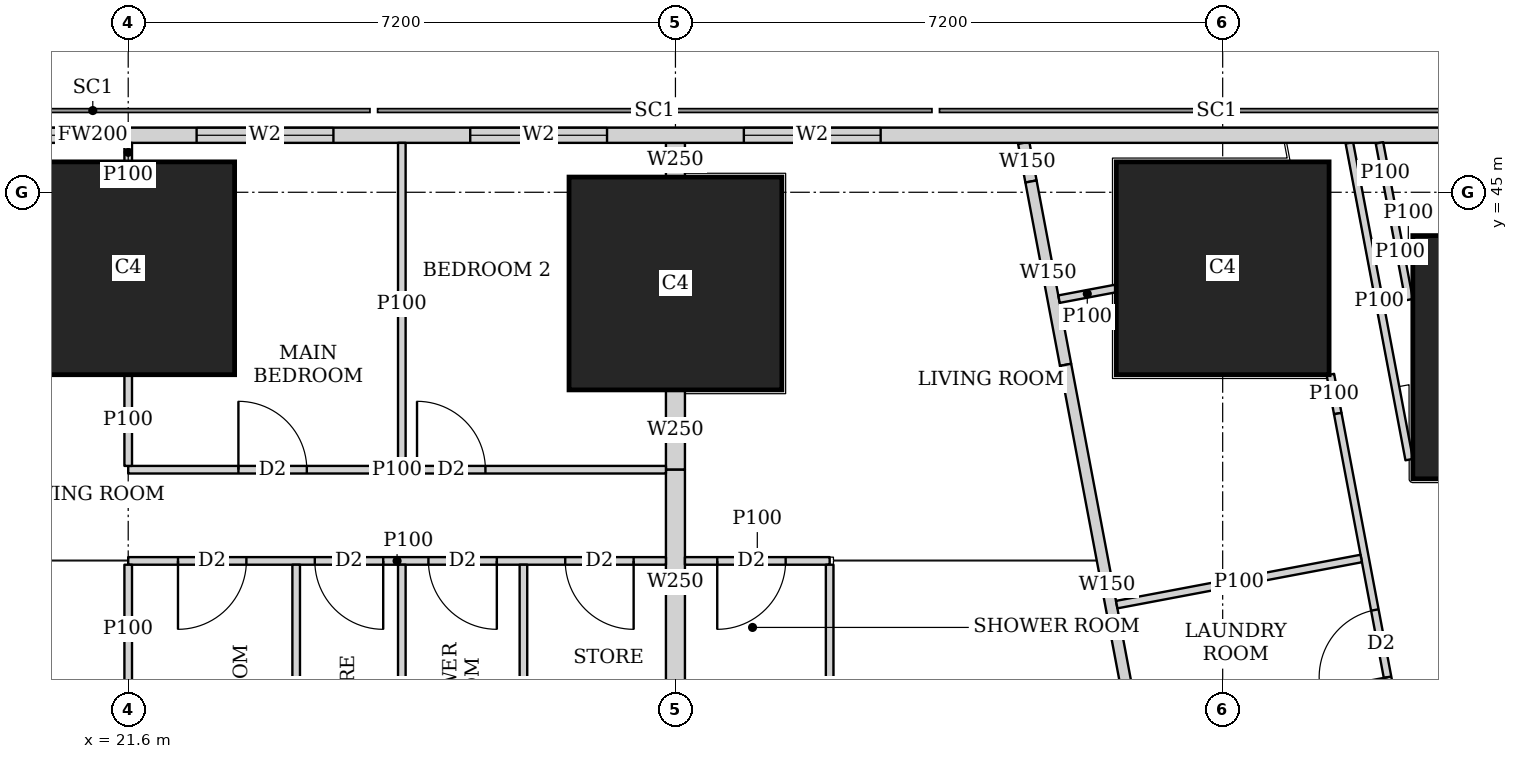
"""IFC4 building model, lengths in metres.
Left out: names, types, materials, properties, quantities, classifications, styles, units other than length and angle.
Written with IfcOpenShell. Run it as: python <this file> out.ifc"""

import sys

from ifc_helpers import new_model, si_unit, direction, frame, frame_2d, origin, origin_2d, place, context, subcontext, project, spatial, rectangle, extrude, element, fill, save


model = new_model("IFC4")
c1 = context("Model", 3, precision=1e-05, world=origin(), true_north=direction((0.0, 1.0)))
c2 = subcontext(c1, "Body", "Model", "MODEL_VIEW")
j1 = project(units=[si_unit("LENGTHUNIT", "METRE"), si_unit("PLANEANGLEUNIT", "RADIAN")], contexts=[c1])
p1 = place(None, origin())
s1 = spatial("IfcSite", under=j1, at=p1, CompositionType="ELEMENT")
p2 = place(p1, origin())
s2 = spatial("IfcBuilding", under=s1, at=p2, CompositionType="ELEMENT")
p3 = place(p2, frame((0.0, 0.0, 53.75)))
s3 = spatial("IfcBuildingStorey", under=s2, at=p3, CompositionType="ELEMENT", Elevation=53.75)
p4 = place(p3, frame((40.102, 42.83, 0.0), z_axis=(0.0, 0.0, 1.0), x_axis=(1.0, 0.0, 0.0)))
e1 = element("IfcColumn", 1, at=p4, inside=s3, PredefinedType="COLUMN", context=c2, shape_type="SweptSolid", body=[
    extrude(rectangle(XDim=3.2, YDim=3.2, at=origin_2d()), origin(), (0.0, 0.0, 1.0), 3.75),
])
for number, where, z_axis, x_axis in (
    (2, (21.6, 44.0, 0.0), (0.0, 0.0, 1.0), (1.0, 0.0, 0.0)),
    (3, (28.8, 43.8, 0.0), (0.0, 0.0, 1.0), (1.0, 0.0, 0.0)),
    (4, (36.0, 44.0, 0.0), (0.0, 0.0, 1.0), (1.0, 0.0, 0.0)),
):
    element("IfcColumn", number, at=place(p3, frame(where, z_axis=z_axis, x_axis=x_axis)), inside=s3, PredefinedType="COLUMN", context=c2, shape_type="SweptSolid", body=[
        extrude(rectangle(XDim=2.8, YDim=2.8, at=origin_2d()), origin(), (0.0, 0.0, 1.0), 3.75),
    ])
p5 = place(p3, frame((40.106, 45.75, 0.0), z_axis=(0.0, 0.0, 1.0), x_axis=(-1.0, 0.0, 0.0)))
e5 = element("IfcWall", 5, at=p5, inside=s3, PredefinedType="SOLIDWALL", context=c2, shape_type="SweptSolid", body=[
    extrude(rectangle(XDim=37.943, YDim=0.2, at=frame_2d((18.971, 0.0))), origin(), (0.0, 0.0, 1.0), 3.5),
])
p6 = place(p5, frame((8.606, 0.0, 0.9)))
e6 = element("IfcOpeningElement", 6, at=p6, cuts=e5, PredefinedType="OPENING", context=c2, shape_type="SweptSolid", body=[
    extrude(rectangle(XDim=1.8, YDim=1.5, at=frame_2d((0.9, 0.75))), frame((0.0, 0.11, 0.0), z_axis=(0.0, -1.0, 0.0), x_axis=(1.0, 0.0, 0.0)), (0.0, 0.0, 1.0), 0.22),
])
p7 = place(p5, frame((12.206, 0.0, 0.9)))
e7 = element("IfcOpeningElement", 7, at=p7, cuts=e5, PredefinedType="OPENING", context=c2, shape_type="SweptSolid", body=[
    extrude(rectangle(XDim=1.8, YDim=1.5, at=frame_2d((0.9, 0.75))), frame((0.0, 0.11, 0.0), z_axis=(0.0, -1.0, 0.0), x_axis=(1.0, 0.0, 0.0)), (0.0, 0.0, 1.0), 0.22),
])
p8 = place(p5, frame((15.806, 0.0, 0.9)))
e8 = element("IfcOpeningElement", 8, at=p8, cuts=e5, PredefinedType="OPENING", context=c2, shape_type="SweptSolid", body=[
    extrude(rectangle(XDim=1.8, YDim=1.5, at=frame_2d((0.9, 0.75))), frame((0.0, 0.11, 0.0), z_axis=(0.0, -1.0, 0.0), x_axis=(1.0, 0.0, 0.0)), (0.0, 0.0, 1.0), 0.22),
])
p9 = place(p5, frame((19.406, 0.0, 0.9)))
e9 = element("IfcOpeningElement", 9, at=p9, cuts=e5, PredefinedType="OPENING", context=c2, shape_type="SweptSolid", body=[
    extrude(rectangle(XDim=1.8, YDim=1.5, at=frame_2d((0.9, 0.75))), frame((0.0, 0.11, 0.0), z_axis=(0.0, -1.0, 0.0), x_axis=(1.0, 0.0, 0.0)), (0.0, 0.0, 1.0), 0.22),
])
p10 = place(p5, frame((23.006, 0.0, 0.9)))
e10 = element("IfcOpeningElement", 10, at=p10, cuts=e5, PredefinedType="OPENING", context=c2, shape_type="SweptSolid", body=[
    extrude(rectangle(XDim=1.8, YDim=1.5, at=frame_2d((0.9, 0.75))), frame((0.0, 0.11, 0.0), z_axis=(0.0, -1.0, 0.0), x_axis=(1.0, 0.0, 0.0)), (0.0, 0.0, 1.0), 0.22),
])
p11 = place(p5, frame((26.606, 0.0, 0.9)))
e11 = element("IfcOpeningElement", 11, at=p11, cuts=e5, PredefinedType="OPENING", context=c2, shape_type="SweptSolid", body=[
    extrude(rectangle(XDim=1.8, YDim=1.5, at=frame_2d((0.9, 0.75))), frame((0.0, 0.11, 0.0), z_axis=(0.0, -1.0, 0.0), x_axis=(1.0, 0.0, 0.0)), (0.0, 0.0, 1.0), 0.22),
])
p12 = place(p3, frame((33.382, 45.65, 0.0), z_axis=(0.0, 0.0, 1.0), x_axis=(0.185657456326, -0.982614527122, 0.0)))
e12 = element("IfcWall", 12, at=p12, inside=s3, PredefinedType="SOLIDWALL", context=c2, shape_type="SweptSolid", body=[
    extrude(rectangle(XDim=0.517, YDim=0.15, at=frame_2d((0.258, 0.0))), origin(), (0.0, 0.0, 1.0), 3.5),
])
p13 = place(p3, frame((33.478, 45.142, 0.0), z_axis=(0.0, 0.0, 1.0), x_axis=(0.185393362436, -0.982664388876, 0.0)))
e13 = element("IfcWall", 13, at=p13, inside=s3, PredefinedType="SOLIDWALL", context=c2, shape_type="SweptSolid", body=[
    extrude(rectangle(XDim=2.455, YDim=0.15, at=frame_2d((1.227, 0.0))), origin(), (0.0, 0.0, 1.0), 2.05),
])
p14 = place(p3, frame((33.933, 42.73, 0.0), z_axis=(0.0, 0.0, 1.0), x_axis=(0.185617897238, -0.982622000682, 0.0)))
e14 = element("IfcWall", 14, at=p14, inside=s3, PredefinedType="SOLIDWALL", context=c2, shape_type="SweptSolid", body=[
    extrude(rectangle(XDim=5.887, YDim=0.15, at=frame_2d((2.944, 0.0))), origin(), (0.0, 0.0, 1.0), 3.5),
])
p15 = place(p3, frame((38.454, 41.483, 0.0), z_axis=(0.0, 0.0, 1.0), x_axis=(-0.185609245326, 0.982623634994, 0.0)))
e15 = element("IfcWall", 15, at=p15, inside=s3, PredefinedType="PARTITIONING", context=c2, shape_type="SweptSolid", body=[
    extrude(rectangle(XDim=4.241, YDim=0.1, at=frame_2d((2.12, 0.0))), origin(), (0.0, 0.0, 1.0), 2.05),
])
p16 = place(p3, frame((38.063, 45.65, 0.0), z_axis=(0.0, 0.0, 1.0), x_axis=(0.186109918919, -0.982528929895, 0.0)))
e16 = element("IfcWall", 16, at=p16, inside=s3, PredefinedType="PARTITIONING", context=c2, shape_type="SweptSolid", body=[
    extrude(rectangle(XDim=0.817, YDim=0.1, at=frame_2d((0.409, 0.0))), origin(), (0.0, 0.0, 1.0), 3.5),
])
p17 = place(p3, frame((38.215, 44.847, 0.0), z_axis=(0.0, 0.0, 1.0), x_axis=(0.185449486507, -0.982653798626, 0.0)))
e17 = element("IfcWall", 17, at=p17, inside=s3, PredefinedType="PARTITIONING", context=c2, shape_type="SweptSolid", body=[
    extrude(rectangle(XDim=1.282, YDim=0.1, at=frame_2d((0.641, 0.0))), origin(), (0.0, 0.0, 1.0), 2.05),
])
p18 = place(p3, frame((37.417, 42.602, 0.0), z_axis=(0.0, 0.0, 1.0), x_axis=(0.185672001976, -0.982611778721, 0.0)))
e18 = element("IfcWall", 18, at=p18, inside=s3, PredefinedType="PARTITIONING", context=c2, shape_type="SweptSolid", body=[
    extrude(rectangle(XDim=0.522, YDim=0.1, at=frame_2d((0.261, 0.0))), origin(), (0.0, 0.0, 1.0), 2.05),
])
p19 = place(p3, frame((37.514, 42.089, 0.0), z_axis=(0.0, 0.0, 1.0), x_axis=(0.1856087397, -0.982623730503, 0.0)))
e19 = element("IfcWall", 19, at=p19, inside=s3, PredefinedType="PARTITIONING", context=c2, shape_type="SweptSolid", body=[
    extrude(rectangle(XDim=13.33, YDim=0.1, at=frame_2d((6.665, 0.0))), origin(), (0.0, 0.0, 1.0), 2.5),
])
p20 = place(p19, frame((11.825, 0.0, 0.0)))
e20 = element("IfcOpeningElement", 20, at=p20, cuts=e19, PredefinedType="OPENING", context=c2, shape_type="SweptSolid", body=[
    extrude(rectangle(XDim=0.9, YDim=2.1, at=frame_2d((0.45, 1.05))), frame((0.0, 0.06, 0.0), z_axis=(0.0, -1.0, 0.0), x_axis=(1.0, 0.0, 0.0)), (0.0, 0.0, 1.0), 0.12),
])
p21 = place(p19, frame((8.203, 0.0, 0.0)))
e21 = element("IfcOpeningElement", 21, at=p21, cuts=e19, PredefinedType="OPENING", context=c2, shape_type="SweptSolid", body=[
    extrude(rectangle(XDim=0.9, YDim=2.1, at=frame_2d((0.45, 1.05))), frame((0.0, 0.06, 0.0), z_axis=(0.0, -1.0, 0.0), x_axis=(1.0, 0.0, 0.0)), (0.0, 0.0, 1.0), 0.12),
])
p22 = place(p19, frame((2.63, 0.0, 0.0)))
e22 = element("IfcOpeningElement", 22, at=p22, cuts=e19, PredefinedType="OPENING", context=c2, shape_type="SweptSolid", body=[
    extrude(rectangle(XDim=0.9, YDim=2.1, at=frame_2d((0.45, 1.05))), frame((0.0, 0.06, 0.0), z_axis=(0.0, -1.0, 0.0), x_axis=(1.0, 0.0, 0.0)), (0.0, 0.0, 1.0), 0.12),
])
p23 = place(p19, frame((9.916, 0.0, 0.0)))
e23 = element("IfcOpeningElement", 23, at=p23, cuts=e19, PredefinedType="OPENING", context=c2, shape_type="SweptSolid", body=[
    extrude(rectangle(XDim=0.9, YDim=2.1, at=frame_2d((0.45, 1.05))), frame((0.0, 0.06, 0.0), z_axis=(0.0, -1.0, 0.0), x_axis=(1.0, 0.0, 0.0)), (0.0, 0.0, 1.0), 0.12),
])
p24 = place(p19, frame((5.535, 0.0, 0.0)))
e24 = element("IfcOpeningElement", 24, at=p24, cuts=e19, PredefinedType="OPENING", context=c2, shape_type="SweptSolid", body=[
    extrude(rectangle(XDim=0.9, YDim=2.1, at=frame_2d((0.45, 1.05))), frame((0.0, 0.06, 0.0), z_axis=(0.0, -1.0, 0.0), x_axis=(1.0, 0.0, 0.0)), (0.0, 0.0, 1.0), 0.12),
])
p25 = place(p3, frame((38.492, 44.193, 0.0), z_axis=(0.0, 0.0, 1.0), x_axis=(-0.981954528773, -0.189117168504, 0.0)))
e25 = element("IfcWall", 25, at=p25, inside=s3, PredefinedType="PARTITIONING", context=c2, shape_type="SweptSolid", body=[
    extrude(rectangle(XDim=0.101, YDim=0.1, at=frame_2d((0.05, 0.0))), origin(), (0.0, 0.0, 1.0), 2.05),
])
p26 = place(p3, frame((34.59, 43.734, 0.0), z_axis=(0.0, 0.0, 1.0), x_axis=(-0.98274036184, -0.184990219229, 0.0)))
e26 = element("IfcWall", 26, at=p26, inside=s3, PredefinedType="PARTITIONING", context=c2, shape_type="SweptSolid", body=[
    extrude(rectangle(XDim=0.756, YDim=0.1, at=frame_2d((0.378, 0.0))), origin(), (0.0, 0.0, 1.0), 2.05),
])
p27 = place(p3, frame((37.823, 40.182, 0.0), z_axis=(0.0, 0.0, 1.0), x_axis=(-0.982664729897, -0.18539155487, 0.0)))
e27 = element("IfcWall", 27, at=p27, inside=s3, PredefinedType="PARTITIONING", context=c2, shape_type="SweptSolid", body=[
    extrude(rectangle(XDim=3.274, YDim=0.1, at=frame_2d((1.637, 0.0))), origin(), (0.0, 0.0, 1.0), 3.5),
])
p28 = place(p3, frame((21.6, 41.35, 0.0), z_axis=(0.0, 0.0, 1.0), x_axis=(1.0, 0.0, 0.0)))
e28 = element("IfcWall", 28, at=p28, inside=s3, PredefinedType="PARTITIONING", context=c2, shape_type="SweptSolid", body=[
    extrude(rectangle(XDim=7.075, YDim=0.1, at=frame_2d((3.538, 0.0))), origin(), (0.0, 0.0, 1.0), 3.5),
])
p29 = place(p28, frame((1.45, 0.0, 0.0)))
e29 = element("IfcOpeningElement", 29, at=p29, cuts=e28, PredefinedType="OPENING", context=c2, shape_type="SweptSolid", body=[
    extrude(rectangle(XDim=0.9, YDim=2.1, at=frame_2d((0.45, 1.05))), frame((0.0, 0.06, 0.0), z_axis=(0.0, -1.0, 0.0), x_axis=(1.0, 0.0, 0.0)), (0.0, 0.0, 1.0), 0.12),
])
p30 = place(p28, frame((3.8, 0.0, 0.0)))
e30 = element("IfcOpeningElement", 30, at=p30, cuts=e28, PredefinedType="OPENING", context=c2, shape_type="SweptSolid", body=[
    extrude(rectangle(XDim=0.9, YDim=2.1, at=frame_2d((0.45, 1.05))), frame((0.0, 0.06, 0.0), z_axis=(0.0, -1.0, 0.0), x_axis=(1.0, 0.0, 0.0)), (0.0, 0.0, 1.0), 0.12),
])
p31 = place(p3, frame((21.6, 40.15, 0.0), z_axis=(0.0, 0.0, 1.0), x_axis=(1.0, 0.0, 0.0)))
e31 = element("IfcWall", 31, at=p31, inside=s3, PredefinedType="PARTITIONING", context=c2, shape_type="SweptSolid", body=[
    extrude(rectangle(XDim=7.075, YDim=0.1, at=frame_2d((3.538, 0.0))), origin(), (0.0, 0.0, 1.0), 3.5),
])
p32 = place(p31, frame((0.655, 0.0, 0.0)))
e32 = element("IfcOpeningElement", 32, at=p32, cuts=e31, PredefinedType="OPENING", context=c2, shape_type="SweptSolid", body=[
    extrude(rectangle(XDim=0.9, YDim=2.1, at=frame_2d((0.45, 1.05))), frame((0.0, 0.06, 0.0), z_axis=(0.0, -1.0, 0.0), x_axis=(1.0, 0.0, 0.0)), (0.0, 0.0, 1.0), 0.12),
])
p33 = place(p31, frame((3.95, 0.0, 0.0)))
e33 = element("IfcOpeningElement", 33, at=p33, cuts=e31, PredefinedType="OPENING", context=c2, shape_type="SweptSolid", body=[
    extrude(rectangle(XDim=0.9, YDim=2.1, at=frame_2d((0.45, 1.05))), frame((0.0, 0.06, 0.0), z_axis=(0.0, -1.0, 0.0), x_axis=(1.0, 0.0, 0.0)), (0.0, 0.0, 1.0), 0.12),
])
p34 = place(p31, frame((2.455, 0.0, 0.0)))
e34 = element("IfcOpeningElement", 34, at=p34, cuts=e31, PredefinedType="OPENING", context=c2, shape_type="SweptSolid", body=[
    extrude(rectangle(XDim=0.9, YDim=2.1, at=frame_2d((0.45, 1.05))), frame((0.0, 0.06, 0.0), z_axis=(0.0, -1.0, 0.0), x_axis=(1.0, 0.0, 0.0)), (0.0, 0.0, 1.0), 0.12),
])
p35 = place(p31, frame((5.75, 0.0, 0.0)))
e35 = element("IfcOpeningElement", 35, at=p35, cuts=e31, PredefinedType="OPENING", context=c2, shape_type="SweptSolid", body=[
    extrude(rectangle(XDim=0.9, YDim=2.1, at=frame_2d((0.45, 1.05))), frame((0.0, 0.06, 0.0), z_axis=(0.0, -1.0, 0.0), x_axis=(1.0, 0.0, 0.0)), (0.0, 0.0, 1.0), 0.12),
])
p36 = place(p3, frame((21.6, 41.4, 0.0), z_axis=(0.0, 0.0, 1.0), x_axis=(0.0, 1.0, 0.0)))
e36 = element("IfcWall", 36, at=p36, inside=s3, PredefinedType="PARTITIONING", context=c2, shape_type="SweptSolid", body=[
    extrude(rectangle(XDim=1.199, YDim=0.1, at=frame_2d((0.6, 0.0))), origin(), (0.0, 0.0, 1.0), 3.5),
])
p37 = place(p3, frame((21.6, 45.401, 0.0), z_axis=(0.0, 0.0, 1.0), x_axis=(0.0, 1.0, 0.0)))
e37 = element("IfcWall", 37, at=p37, inside=s3, PredefinedType="PARTITIONING", context=c2, shape_type="SweptSolid", body=[
    extrude(rectangle(XDim=0.249, YDim=0.1, at=frame_2d((0.125, 0.0))), origin(), (0.0, 0.0, 1.0), 3.5),
])
p38 = place(p3, frame((25.2, 41.4, 0.0), z_axis=(0.0, 0.0, 1.0), x_axis=(0.0, 1.0, 0.0)))
e38 = element("IfcWall", 38, at=p38, inside=s3, PredefinedType="PARTITIONING", context=c2, shape_type="SweptSolid", body=[
    extrude(rectangle(XDim=4.25, YDim=0.1, at=frame_2d((2.125, 0.0))), origin(), (0.0, 0.0, 1.0), 2.05),
])
p39 = place(p3, frame((21.6, 38.401, 0.0), z_axis=(0.0, 0.0, 1.0), x_axis=(0.0, 1.0, 0.0)))
e39 = element("IfcWall", 39, at=p39, inside=s3, PredefinedType="PARTITIONING", context=c2, shape_type="SweptSolid", body=[
    extrude(rectangle(XDim=1.699, YDim=0.1, at=frame_2d((0.85, 0.0))), origin(), (0.0, 0.0, 1.0), 3.5),
])
for number, where, z_axis, x_axis in (
    (40, (25.2, 36.825, 0.0), (0.0, 0.0, 1.0), (0.0, 1.0, 0.0)),
    (41, (23.81, 36.825, 0.0), (0.0, 0.0, 1.0), (0.0, 1.0, 0.0)),
    (42, (26.8, 36.825, 0.0), (0.0, 0.0, 1.0), (0.0, 1.0, 0.0)),
):
    element("IfcWall", number, at=place(p3, frame(where, z_axis=z_axis, x_axis=x_axis)), inside=s3, PredefinedType="PARTITIONING", context=c2, shape_type="SweptSolid", body=[
        extrude(rectangle(XDim=3.275, YDim=0.1, at=frame_2d((1.638, 0.0))), origin(), (0.0, 0.0, 1.0), 3.5),
    ])
p40 = place(p3, frame((28.925, 40.15, 0.0), z_axis=(0.0, 0.0, 1.0), x_axis=(1.0, 0.0, 0.0)))
e43 = element("IfcWall", 43, at=p40, inside=s3, PredefinedType="PARTITIONING", context=c2, shape_type="SweptSolid", body=[
    extrude(rectangle(XDim=1.904, YDim=0.1, at=frame_2d((0.952, 0.0))), origin(), (0.0, 0.0, 1.0), 3.5),
])
p41 = place(p40, frame((0.425, 0.0, 0.0)))
e44 = element("IfcOpeningElement", 44, at=p41, cuts=e43, PredefinedType="OPENING", context=c2, shape_type="SweptSolid", body=[
    extrude(rectangle(XDim=0.9, YDim=2.1, at=frame_2d((0.45, 1.05))), frame((0.0, 0.06, 0.0), z_axis=(0.0, -1.0, 0.0), x_axis=(1.0, 0.0, 0.0)), (0.0, 0.0, 1.0), 0.12),
])
p42 = place(p3, frame((30.829, 36.825, 0.0), z_axis=(0.0, 0.0, 1.0), x_axis=(0.0, 1.0, 0.0)))
e45 = element("IfcWall", 45, at=p42, inside=s3, PredefinedType="PARTITIONING", context=c2, shape_type="SweptSolid", body=[
    extrude(rectangle(XDim=3.275, YDim=0.1, at=frame_2d((1.638, 0.0))), origin(), (0.0, 0.0, 1.0), 3.5),
])
p43 = place(p3, frame((28.8, 41.35, 0.0), z_axis=(0.0, 0.0, 1.0), x_axis=(0.0, 1.0, 0.0)))
e46 = element("IfcWall", 46, at=p43, inside=s3, PredefinedType="SOLIDWALL", context=c2, shape_type="SweptSolid", body=[
    extrude(rectangle(XDim=1.049, YDim=0.25, at=frame_2d((0.524, 0.0))), origin(), (0.0, 0.0, 1.0), 3.5),
])
p44 = place(p3, frame((28.8, 45.201, 0.0), z_axis=(0.0, 0.0, 1.0), x_axis=(0.0, 1.0, 0.0)))
e47 = element("IfcWall", 47, at=p44, inside=s3, PredefinedType="SOLIDWALL", context=c2, shape_type="SweptSolid", body=[
    extrude(rectangle(XDim=0.449, YDim=0.25, at=frame_2d((0.225, 0.0))), origin(), (0.0, 0.0, 1.0), 3.5),
])
p45 = place(p3, frame((28.8, 38.401, 0.0), z_axis=(0.0, 0.0, 1.0), x_axis=(0.0, 1.0, 0.0)))
e48 = element("IfcWall", 48, at=p45, inside=s3, PredefinedType="SOLIDWALL", context=c2, shape_type="SweptSolid", body=[
    extrude(rectangle(XDim=2.949, YDim=0.25, at=frame_2d((1.475, 0.0))), origin(), (0.0, 0.0, 1.0), 3.5),
])
p46 = place(p6, origin())
e49 = element("IfcWindow", 49, at=p46, inside=s3, PartitioningType="SINGLE_PANEL", PredefinedType="WINDOW", context=c2, shape_type="SweptSolid", body=[
    extrude(rectangle(XDim=1.8, YDim=1.5, at=frame_2d((0.9, 0.75))), frame((0.0, 0.03, 0.0), z_axis=(0.0, -1.0, 0.0), x_axis=(1.0, 0.0, 0.0)), (0.0, 0.0, 1.0), 0.06),
])
fill(e6, e49)
p47 = place(p7, origin())
e50 = element("IfcWindow", 50, at=p47, inside=s3, PartitioningType="SINGLE_PANEL", PredefinedType="WINDOW", context=c2, shape_type="SweptSolid", body=[
    extrude(rectangle(XDim=1.8, YDim=1.5, at=frame_2d((0.9, 0.75))), frame((0.0, 0.03, 0.0), z_axis=(0.0, -1.0, 0.0), x_axis=(1.0, 0.0, 0.0)), (0.0, 0.0, 1.0), 0.06),
])
fill(e7, e50)
p48 = place(p8, origin())
e51 = element("IfcWindow", 51, at=p48, inside=s3, PartitioningType="SINGLE_PANEL", PredefinedType="WINDOW", context=c2, shape_type="SweptSolid", body=[
    extrude(rectangle(XDim=1.8, YDim=1.5, at=frame_2d((0.9, 0.75))), frame((0.0, 0.03, 0.0), z_axis=(0.0, -1.0, 0.0), x_axis=(1.0, 0.0, 0.0)), (0.0, 0.0, 1.0), 0.06),
])
fill(e8, e51)
p49 = place(p9, origin())
e52 = element("IfcWindow", 52, at=p49, inside=s3, PartitioningType="SINGLE_PANEL", PredefinedType="WINDOW", context=c2, shape_type="SweptSolid", body=[
    extrude(rectangle(XDim=1.8, YDim=1.5, at=frame_2d((0.9, 0.75))), frame((0.0, 0.03, 0.0), z_axis=(0.0, -1.0, 0.0), x_axis=(1.0, 0.0, 0.0)), (0.0, 0.0, 1.0), 0.06),
])
fill(e9, e52)
p50 = place(p22, origin())
e53 = element("IfcDoor", 53, at=p50, inside=s3, OperationType="SINGLE_SWING_LEFT", PredefinedType="DOOR", context=c2, shape_type="SweptSolid", body=[
    extrude(rectangle(XDim=0.9, YDim=2.1, at=frame_2d((0.45, 1.05))), frame((0.0, 0.025, 0.0), z_axis=(0.0, -1.0, 0.0), x_axis=(1.0, 0.0, 0.0)), (0.0, 0.0, 1.0), 0.05),
])
fill(e22, e53)
p51 = place(p29, origin())
e54 = element("IfcDoor", 54, at=p51, inside=s3, OperationType="SINGLE_SWING_LEFT", PredefinedType="DOOR", context=c2, shape_type="SweptSolid", body=[
    extrude(rectangle(XDim=0.9, YDim=2.1, at=frame_2d((0.45, 1.05))), frame((0.0, 0.025, 0.0), z_axis=(0.0, -1.0, 0.0), x_axis=(1.0, 0.0, 0.0)), (0.0, 0.0, 1.0), 0.05),
])
fill(e29, e54)
p52 = place(p30, origin())
e55 = element("IfcDoor", 55, at=p52, inside=s3, OperationType="SINGLE_SWING_LEFT", PredefinedType="DOOR", context=c2, shape_type="SweptSolid", body=[
    extrude(rectangle(XDim=0.9, YDim=2.1, at=frame_2d((0.45, 1.05))), frame((0.0, 0.025, 0.0), z_axis=(0.0, -1.0, 0.0), x_axis=(1.0, 0.0, 0.0)), (0.0, 0.0, 1.0), 0.05),
])
fill(e30, e55)
p53 = place(p32, origin())
e56 = element("IfcDoor", 56, at=p53, inside=s3, OperationType="SINGLE_SWING_RIGHT", PredefinedType="DOOR", context=c2, shape_type="SweptSolid", body=[
    extrude(rectangle(XDim=0.9, YDim=2.1, at=frame_2d((0.45, 1.05))), frame((0.0, 0.025, 0.0), z_axis=(0.0, -1.0, 0.0), x_axis=(1.0, 0.0, 0.0)), (0.0, 0.0, 1.0), 0.05),
])
fill(e32, e56)
p54 = place(p33, origin())
e57 = element("IfcDoor", 57, at=p54, inside=s3, OperationType="SINGLE_SWING_LEFT", PredefinedType="DOOR", context=c2, shape_type="SweptSolid", body=[
    extrude(rectangle(XDim=0.9, YDim=2.1, at=frame_2d((0.45, 1.05))), frame((0.0, 0.025, 0.0), z_axis=(0.0, -1.0, 0.0), x_axis=(1.0, 0.0, 0.0)), (0.0, 0.0, 1.0), 0.05),
])
fill(e33, e57)
p55 = place(p34, origin())
e58 = element("IfcDoor", 58, at=p55, inside=s3, OperationType="SINGLE_SWING_LEFT", PredefinedType="DOOR", context=c2, shape_type="SweptSolid", body=[
    extrude(rectangle(XDim=0.9, YDim=2.1, at=frame_2d((0.45, 1.05))), frame((0.0, 0.025, 0.0), z_axis=(0.0, -1.0, 0.0), x_axis=(1.0, 0.0, 0.0)), (0.0, 0.0, 1.0), 0.05),
])
fill(e34, e58)
p56 = place(p35, origin())
e59 = element("IfcDoor", 59, at=p56, inside=s3, OperationType="SINGLE_SWING_LEFT", PredefinedType="DOOR", context=c2, shape_type="SweptSolid", body=[
    extrude(rectangle(XDim=0.9, YDim=2.1, at=frame_2d((0.45, 1.05))), frame((0.0, 0.025, 0.0), z_axis=(0.0, -1.0, 0.0), x_axis=(1.0, 0.0, 0.0)), (0.0, 0.0, 1.0), 0.05),
])
fill(e35, e59)
p57 = place(p41, origin())
e60 = element("IfcDoor", 60, at=p57, inside=s3, OperationType="SINGLE_SWING_RIGHT", PredefinedType="DOOR", context=c2, shape_type="SweptSolid", body=[
    extrude(rectangle(XDim=0.9, YDim=2.1, at=frame_2d((0.45, 1.05))), frame((0.0, 0.025, 0.0), z_axis=(0.0, -1.0, 0.0), x_axis=(1.0, 0.0, 0.0)), (0.0, 0.0, 1.0), 0.05),
])
fill(e44, e60)
save(model, sys.argv[1])
